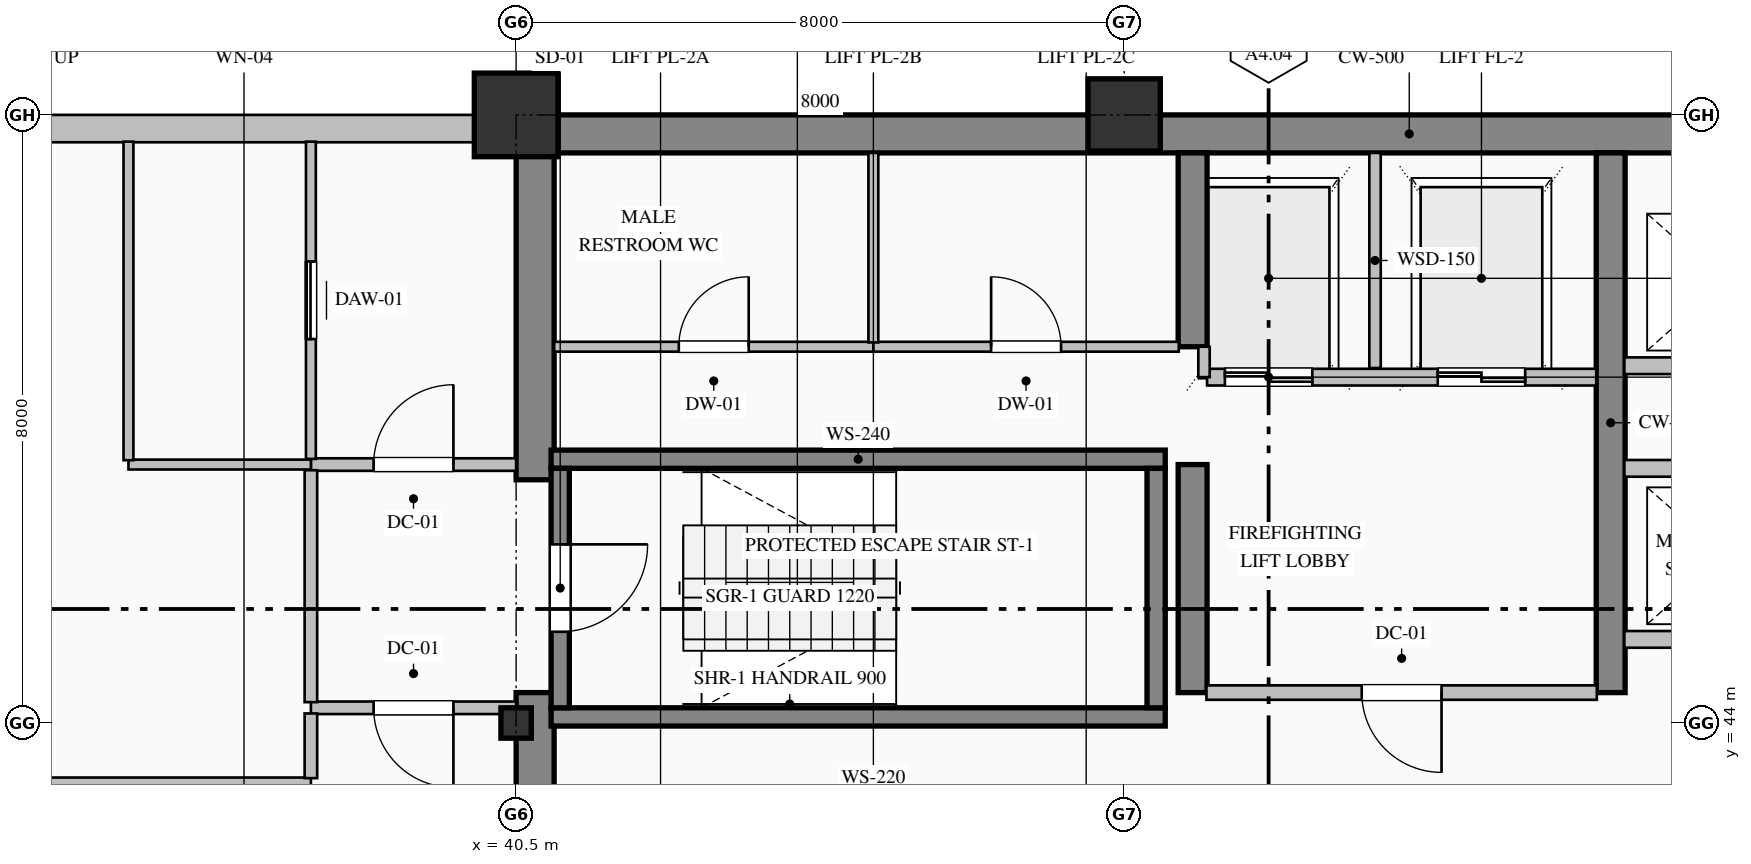
"""IFC4 building model, lengths in metres.
Left out: names, types, materials, properties, quantities, classifications, styles, units other than length and angle.
Written with IfcOpenShell. Run it as: python <this file> out.ifc"""

import sys

from ifc_helpers import new_model, si_unit, direction, frame, frame_2d, origin, origin_2d, place, context, subcontext, project, spatial, rectangle, hollow_rectangle, i_section, extrude, element, fill, save


model = new_model("IFC4")
c1 = context("Model", 3, precision=1e-05, world=origin(), true_north=direction((0.0, 1.0)))
c2 = subcontext(c1, "Body", "Model", "MODEL_VIEW")
j1 = project(units=[si_unit("LENGTHUNIT", "METRE"), si_unit("PLANEANGLEUNIT", "RADIAN")], contexts=[c1])
p1 = place(None, origin())
s1 = spatial("IfcSite", under=j1, at=p1, CompositionType="ELEMENT")
p2 = place(p1, origin())
s2 = spatial("IfcBuilding", under=s1, at=p2, CompositionType="ELEMENT")
p3 = place(p2, frame((0.0, 0.0, 151.0)))
s3 = spatial("IfcBuildingStorey", under=s2, at=p3, CompositionType="ELEMENT", Elevation=151.0)
p4 = place(p3, frame((40.5, 51.75, 0.0), z_axis=(0.0, 0.0, 1.0), x_axis=(1.0, 0.0, 0.0)))
e1 = element("IfcWall", 1, at=p4, inside=s3, PredefinedType="SHEAR", context=c2, shape_type="SweptSolid", body=[
    extrude(rectangle(XDim=23.5, YDim=0.5, at=frame_2d((11.75, 0.0))), origin(), (0.0, 0.0, 1.0), 3.765),
])
p5 = place(p3, frame((40.75, 36.5, 0.0), z_axis=(0.0, 0.0, 1.0), x_axis=(0.0, 1.0, 0.0)))
e2 = element("IfcWall", 2, at=p5, inside=s3, PredefinedType="SHEAR", context=c2, shape_type="SweptSolid", body=[
    extrude(rectangle(XDim=7.9, YDim=0.5, at=frame_2d((3.95, 0.0))), origin(), (0.0, 0.0, 1.0), 3.765),
])
p6 = place(p3, frame((40.75, 47.2, 0.0), z_axis=(0.0, 0.0, 1.0), x_axis=(0.0, 1.0, 0.0)))
e3 = element("IfcWall", 3, at=p6, inside=s3, PredefinedType="SHEAR", context=c2, shape_type="SweptSolid", body=[
    extrude(rectangle(XDim=4.3, YDim=0.5, at=frame_2d((2.15, 0.0))), origin(), (0.0, 0.0, 1.0), 3.765),
])
p7 = place(p3, frame((49.4, 44.4, 0.0), z_axis=(0.0, 0.0, 1.0), x_axis=(0.0, 1.0, 0.0)))
e4 = element("IfcWall", 4, at=p7, inside=s3, PredefinedType="SHEAR", context=c2, shape_type="SweptSolid", body=[
    extrude(rectangle(XDim=3.0, YDim=0.38, at=frame_2d((1.5, 0.0))), origin(), (0.0, 0.0, 1.0), 3.765),
])
p8 = place(p3, frame((49.4, 48.95, 0.0), z_axis=(0.0, 0.0, 1.0), x_axis=(0.0, 1.0, 0.0)))
e5 = element("IfcWall", 5, at=p8, inside=s3, PredefinedType="SHEAR", context=c2, shape_type="SweptSolid", body=[
    extrude(rectangle(XDim=2.55, YDim=0.38, at=frame_2d((1.275, 0.0))), origin(), (0.0, 0.0, 1.0), 3.765),
])
p9 = place(p3, frame((54.9, 44.4, 0.0), z_axis=(0.0, 0.0, 1.0), x_axis=(0.0, 1.0, 0.0)))
e6 = element("IfcWall", 6, at=p9, inside=s3, PredefinedType="SHEAR", context=c2, shape_type="SweptSolid", body=[
    extrude(rectangle(XDim=7.1, YDim=0.38, at=frame_2d((3.55, 0.0))), origin(), (0.0, 0.0, 1.0), 3.765),
])
p10 = place(p3, frame((40.5, 44.0, 0.0), z_axis=(0.0, 0.0, 1.0), x_axis=(1.0, 0.0, 0.0)))
e7 = element("IfcColumn", 7, at=p10, inside=s3, PredefinedType="COLUMN", context=c2, shape_type="SweptSolid", body=[
    extrude(i_section(OverallWidth=0.4, OverallDepth=0.4, WebThickness=0.013, FlangeThickness=0.021, FilletRadius=0.022, at=origin_2d()), origin(), (0.0, 0.0, 1.0), 4.0),
])
p11 = place(p3, frame((40.5, 52.0, 0.0), z_axis=(0.0, 0.0, 1.0), x_axis=(1.0, 0.0, 0.0)))
e8 = element("IfcColumn", 8, at=p11, inside=s3, PredefinedType="COLUMN", context=c2, shape_type="SweptSolid", body=[
    extrude(hollow_rectangle(XDim=1.1, YDim=1.1, WallThickness=0.04, at=origin_2d()), origin(), (0.0, 0.0, 1.0), 4.0),
])
p12 = place(p3, frame((48.5, 52.0, 0.0), z_axis=(0.0, 0.0, 1.0), x_axis=(1.0, 0.0, 0.0)))
e9 = element("IfcColumn", 9, at=p12, inside=s3, PredefinedType="COLUMN", context=c2, shape_type="SweptSolid", body=[
    extrude(hollow_rectangle(XDim=0.95, YDim=0.95, WallThickness=0.036, at=origin_2d()), origin(), (0.0, 0.0, 1.0), 4.0),
])
p13 = place(p3, frame((13.0, 51.82, 0.0), z_axis=(0.0, 0.0, 1.0), x_axis=(1.0, 0.0, 0.0)))
e10 = element("IfcWall", 10, at=p13, inside=s3, PredefinedType="SOLIDWALL", context=c2, shape_type="SweptSolid", body=[
    extrude(rectangle(XDim=27.52, YDim=0.36, at=frame_2d((13.76, 0.0))), origin(), (0.0, 0.0, 1.0), 3.265),
])
p14 = place(p13, frame((6.45, 0.0, 0.85)))
e11 = element("IfcOpeningElement", 11, at=p14, cuts=e10, PredefinedType="OPENING", context=c2, shape_type="SweptSolid", body=[
    extrude(rectangle(XDim=1.5, YDim=1.95, at=frame_2d((0.75, 0.975))), frame((0.0, 0.19, 0.0), z_axis=(0.0, -1.0, 0.0), x_axis=(1.0, 0.0, 0.0)), (0.0, 0.0, 1.0), 0.38),
])
p15 = place(p13, frame((13.8, 0.0, 0.7)))
e12 = element("IfcOpeningElement", 12, at=p15, cuts=e10, PredefinedType="OPENING", context=c2, shape_type="SweptSolid", body=[
    extrude(rectangle(XDim=1.2, YDim=1.85, at=frame_2d((0.6, 0.925))), frame((0.0, 0.19, 0.0), z_axis=(0.0, -1.0, 0.0), x_axis=(1.0, 0.0, 0.0)), (0.0, 0.0, 1.0), 0.38),
])
for number, where, z_axis, x_axis in (
    (13, (40.96, 47.47, 0.0), (0.0, 0.0, 1.0), (1.0, 0.0, 0.0)),
    (14, (49.04, 44.08, 0.0), (0.0, 0.0, 1.0), (-1.0, 0.0, 0.0)),
):
    element("IfcWall", number, at=place(p3, frame(where, z_axis=z_axis, x_axis=x_axis)), inside=s3, PredefinedType="SOLIDWALL", context=c2, shape_type="SweptSolid", body=[
        extrude(rectangle(XDim=8.08, YDim=0.24, at=frame_2d((4.04, 0.0))), origin(), (0.0, 0.0, 1.0), 4.0),
    ])
p16 = place(p3, frame((41.08, 47.35, 0.0), z_axis=(0.0, 0.0, 1.0), x_axis=(0.0, -1.0, 0.0)))
e15 = element("IfcWall", 15, at=p16, inside=s3, PredefinedType="SOLIDWALL", context=c2, shape_type="SweptSolid", body=[
    extrude(rectangle(XDim=3.15, YDim=0.24, at=frame_2d((1.575, 0.0))), origin(), (0.0, 0.0, 1.0), 4.0),
])
p17 = place(p16, frame((1.0, 0.0, 0.0)))
e16 = element("IfcOpeningElement", 16, at=p17, cuts=e15, PredefinedType="OPENING", context=c2, shape_type="SweptSolid", body=[
    extrude(rectangle(XDim=1.15, YDim=2.2, at=frame_2d((0.575, 1.1))), frame((0.0, 0.13, 0.0), z_axis=(0.0, -1.0, 0.0), x_axis=(1.0, 0.0, 0.0)), (0.0, 0.0, 1.0), 0.26),
])
p18 = place(p3, frame((48.92, 44.2, 0.0), z_axis=(0.0, 0.0, 1.0), x_axis=(0.0, 1.0, 0.0)))
e17 = element("IfcWall", 17, at=p18, inside=s3, PredefinedType="SOLIDWALL", context=c2, shape_type="SweptSolid", body=[
    extrude(rectangle(XDim=3.15, YDim=0.24, at=frame_2d((1.575, 0.0))), origin(), (0.0, 0.0, 1.0), 4.0),
])
p19 = place(p3, frame((54.71, 48.55, 0.0), z_axis=(0.0, 0.0, 1.0), x_axis=(-1.0, 0.0, 0.0)))
e18 = element("IfcWall", 18, at=p19, inside=s3, PredefinedType="PARTITIONING", context=c2, shape_type="SweptSolid", body=[
    extrude(rectangle(XDim=5.12, YDim=0.22, at=frame_2d((2.56, 0.0))), origin(), (0.0, 0.0, 1.0), 3.765),
])
p20 = place(p19, frame((3.735, 0.0, 0.0)))
e19 = element("IfcOpeningElement", 19, at=p20, cuts=e18, PredefinedType="OPENING", context=c2, shape_type="SweptSolid", body=[
    extrude(rectangle(XDim=1.15, YDim=2.2, at=frame_2d((0.575, 1.1))), frame((0.0, 0.12, 0.0), z_axis=(0.0, -1.0, 0.0), x_axis=(1.0, 0.0, 0.0)), (0.0, 0.0, 1.0), 0.24),
])
p21 = place(p19, frame((0.935, 0.0, 0.0)))
e20 = element("IfcOpeningElement", 20, at=p21, cuts=e18, PredefinedType="OPENING", context=c2, shape_type="SweptSolid", body=[
    extrude(rectangle(XDim=1.15, YDim=2.2, at=frame_2d((0.575, 1.1))), frame((0.0, 0.12, 0.0), z_axis=(0.0, -1.0, 0.0), x_axis=(1.0, 0.0, 0.0)), (0.0, 0.0, 1.0), 0.24),
])
p22 = place(p3, frame((51.8, 48.67, 0.0), z_axis=(0.0, 0.0, 1.0), x_axis=(0.0, 1.0, 0.0)))
e21 = element("IfcWall", 21, at=p22, inside=s3, PredefinedType="PARTITIONING", context=c2, shape_type="SweptSolid", body=[
    extrude(rectangle(XDim=2.83, YDim=0.15, at=frame_2d((1.415, 0.0))), origin(), (0.0, 0.0, 1.0), 3.765),
])
p23 = place(p3, frame((49.55, 48.55, 0.0), z_axis=(0.0, 0.0, 1.0), x_axis=(0.0, 1.0, 0.0)))
e22 = element("IfcWall", 22, at=p23, inside=s3, PredefinedType="PARTITIONING", context=c2, shape_type="SweptSolid", body=[
    extrude(rectangle(XDim=0.4, YDim=0.15, at=frame_2d((0.2, 0.0))), origin(), (0.0, 0.0, 1.0), 3.765),
])
for number, where, z_axis, x_axis in (
    (23, (63.32, 45.1, 0.0), (0.0, 0.0, 1.0), (-1.0, 0.0, 0.0)),
    (24, (55.08, 47.35, 0.0), (0.0, 0.0, 1.0), (1.0, 0.0, 0.0)),
    (25, (63.32, 48.7, 0.0), (0.0, 0.0, 1.0), (-1.0, 0.0, 0.0)),
):
    element("IfcWall", number, at=place(p3, frame(where, z_axis=z_axis, x_axis=x_axis)), inside=s3, PredefinedType="PARTITIONING", context=c2, shape_type="SweptSolid", body=[
        extrude(rectangle(XDim=8.24, YDim=0.22, at=frame_2d((4.12, 0.0))), origin(), (0.0, 0.0, 1.0), 3.765),
    ])
p24 = place(p3, frame((37.8, 47.4, 0.0), z_axis=(0.0, 0.0, 1.0), x_axis=(1.0, 0.0, 0.0)))
e26 = element("IfcWall", 26, at=p24, inside=s3, PredefinedType="PARTITIONING", context=c2, shape_type="SweptSolid", body=[
    extrude(rectangle(XDim=2.7, YDim=0.165, at=frame_2d((1.35, 0.0))), origin(), (0.0, 0.0, 1.0), 3.765),
])
p25 = place(p24, frame((0.825, 0.0, 0.0)))
e27 = element("IfcOpeningElement", 27, at=p25, cuts=e26, PredefinedType="OPENING", context=c2, shape_type="SweptSolid", body=[
    extrude(rectangle(XDim=1.05, YDim=2.15, at=frame_2d((0.525, 1.075))), frame((0.0, 0.093, 0.0), z_axis=(0.0, -1.0, 0.0), x_axis=(1.0, 0.0, 0.0)), (0.0, 0.0, 1.0), 0.185),
])
p26 = place(p3, frame((40.5, 44.2, 0.0), z_axis=(0.0, 0.0, 1.0), x_axis=(-1.0, 0.0, 0.0)))
e28 = element("IfcWall", 28, at=p26, inside=s3, PredefinedType="PARTITIONING", context=c2, shape_type="SweptSolid", body=[
    extrude(rectangle(XDim=2.7, YDim=0.165, at=frame_2d((1.35, 0.0))), origin(), (0.0, 0.0, 1.0), 3.765),
])
p27 = place(p26, frame((0.825, 0.0, 0.0)))
e29 = element("IfcOpeningElement", 29, at=p27, cuts=e28, PredefinedType="OPENING", context=c2, shape_type="SweptSolid", body=[
    extrude(rectangle(XDim=1.05, YDim=2.15, at=frame_2d((0.525, 1.075))), frame((0.0, 0.093, 0.0), z_axis=(0.0, -1.0, 0.0), x_axis=(1.0, 0.0, 0.0)), (0.0, 0.0, 1.0), 0.185),
])
p28 = place(p3, frame((37.8, 44.274, 0.0), z_axis=(0.0, 0.0, 1.0), x_axis=(0.0, 1.0, 0.0)))
e30 = element("IfcWall", 30, at=p28, inside=s3, PredefinedType="PARTITIONING", context=c2, shape_type="SweptSolid", body=[
    extrude(rectangle(XDim=3.051, YDim=0.165, at=frame_2d((1.525, 0.0))), origin(), (0.0, 0.0, 1.0), 3.765),
])
p29 = place(p3, frame((37.8, 47.475, 0.0), z_axis=(0.0, 0.0, 1.0), x_axis=(0.0, 1.0, 0.0)))
e31 = element("IfcWall", 31, at=p29, inside=s3, PredefinedType="PARTITIONING", context=c2, shape_type="SweptSolid", body=[
    extrude(rectangle(XDim=4.173, YDim=0.13, at=frame_2d((2.087, 0.0))), origin(), (0.0, 0.0, 1.0), 3.765),
])
p30 = place(p29, frame((1.577, 0.0, 0.0)))
e32 = element("IfcOpeningElement", 32, at=p30, cuts=e31, PredefinedType="OPENING", context=c2, shape_type="SweptSolid", body=[
    extrude(rectangle(XDim=1.02, YDim=2.15, at=frame_2d((0.51, 1.075))), frame((0.0, 0.075, 0.0), z_axis=(0.0, -1.0, 0.0), x_axis=(1.0, 0.0, 0.0)), (0.0, 0.0, 1.0), 0.15),
])
p31 = place(p3, frame((37.8, 47.4, 0.0), z_axis=(0.0, 0.0, 1.0), x_axis=(-1.0, 0.0, 0.0)))
e33 = element("IfcWall", 33, at=p31, inside=s3, PredefinedType="PARTITIONING", context=c2, shape_type="SweptSolid", body=[
    extrude(rectangle(XDim=2.4, YDim=0.13, at=frame_2d((1.2, 0.0))), origin(), (0.0, 0.0, 1.0), 3.765),
])
p32 = place(p3, frame((35.4, 47.457, 0.0), z_axis=(0.0, 0.0, 1.0), x_axis=(0.0, 1.0, 0.0)))
e34 = element("IfcWall", 34, at=p32, inside=s3, PredefinedType="PARTITIONING", context=c2, shape_type="SweptSolid", body=[
    extrude(rectangle(XDim=4.191, YDim=0.13, at=frame_2d((2.095, 0.0))), origin(), (0.0, 0.0, 1.0), 3.765),
])
p33 = place(p3, frame((41.0, 48.95, 0.0), z_axis=(0.0, 0.0, 1.0), x_axis=(1.0, 0.0, 0.0)))
e35 = element("IfcWall", 35, at=p33, inside=s3, PredefinedType="PARTITIONING", context=c2, shape_type="SweptSolid", body=[
    extrude(rectangle(XDim=4.2, YDim=0.13, at=frame_2d((2.1, 0.0))), origin(), (0.0, 0.0, 1.0), 3.765),
])
p34 = place(p33, frame((1.64, 0.0, 0.0)))
e36 = element("IfcOpeningElement", 36, at=p34, cuts=e35, PredefinedType="OPENING", context=c2, shape_type="SweptSolid", body=[
    extrude(rectangle(XDim=0.92, YDim=2.15, at=frame_2d((0.46, 1.075))), frame((0.0, 0.075, 0.0), z_axis=(0.0, -1.0, 0.0), x_axis=(1.0, 0.0, 0.0)), (0.0, 0.0, 1.0), 0.15),
])
p35 = place(p3, frame((45.2, 48.95, 0.0), z_axis=(0.0, 0.0, 1.0), x_axis=(1.0, 0.0, 0.0)))
e37 = element("IfcWall", 37, at=p35, inside=s3, PredefinedType="PARTITIONING", context=c2, shape_type="SweptSolid", body=[
    extrude(rectangle(XDim=4.018, YDim=0.13, at=frame_2d((2.009, 0.0))), origin(), (0.0, 0.0, 1.0), 3.765),
])
p36 = place(p35, frame((1.549, 0.0, 0.0)))
e38 = element("IfcOpeningElement", 38, at=p36, cuts=e37, PredefinedType="OPENING", context=c2, shape_type="SweptSolid", body=[
    extrude(rectangle(XDim=0.92, YDim=2.15, at=frame_2d((0.46, 1.075))), frame((0.0, 0.075, 0.0), z_axis=(0.0, -1.0, 0.0), x_axis=(1.0, 0.0, 0.0)), (0.0, 0.0, 1.0), 0.15),
])
p37 = place(p3, frame((54.718, 44.4, 0.0), z_axis=(0.0, 0.0, 1.0), x_axis=(-1.0, 0.0, 0.0)))
e39 = element("IfcWall", 39, at=p37, inside=s3, PredefinedType="PARTITIONING", context=c2, shape_type="SweptSolid", body=[
    extrude(rectangle(XDim=5.136, YDim=0.19, at=frame_2d((2.568, 0.0))), origin(), (0.0, 0.0, 1.0), 3.765),
])
p38 = place(p37, frame((2.043, 0.0, 0.0)))
e40 = element("IfcOpeningElement", 40, at=p38, cuts=e39, PredefinedType="OPENING", context=c2, shape_type="SweptSolid", body=[
    extrude(rectangle(XDim=1.05, YDim=2.15, at=frame_2d((0.525, 1.075))), frame((0.0, 0.105, 0.0), z_axis=(0.0, -1.0, 0.0), x_axis=(1.0, 0.0, 0.0)), (0.0, 0.0, 1.0), 0.21),
])
p39 = place(p3, frame((45.2, 51.5, 0.0), z_axis=(0.0, 0.0, 1.0), x_axis=(0.0, -1.0, 0.0)))
e41 = element("IfcWall", 41, at=p39, inside=s3, PredefinedType="PARTITIONING", context=c2, shape_type="SweptSolid", body=[
    extrude(rectangle(XDim=2.493, YDim=0.13, at=frame_2d((1.247, 0.0))), origin(), (0.0, 0.0, 1.0), 3.765),
])
p40 = place(p3, frame((24.5, 43.2, 0.0), z_axis=(0.0, 0.0, 1.0), x_axis=(1.0, 0.0, 0.0)))
e42 = element("IfcWall", 42, at=p40, inside=s3, PredefinedType="PARTITIONING", context=c2, shape_type="SweptSolid", body=[
    extrude(rectangle(XDim=13.3, YDim=0.165, at=frame_2d((6.65, 0.0))), origin(), (0.0, 0.0, 1.0), 3.765),
])
p41 = place(p40, frame((6.2, 0.0, 0.0)))
e43 = element("IfcOpeningElement", 43, at=p41, cuts=e42, PredefinedType="OPENING", context=c2, shape_type="SweptSolid", body=[
    extrude(rectangle(XDim=0.9, YDim=2.15, at=frame_2d((0.45, 1.075))), frame((0.0, 0.093, 0.0), z_axis=(0.0, -1.0, 0.0), x_axis=(1.0, 0.0, 0.0)), (0.0, 0.0, 1.0), 0.185),
])
p42 = place(p3, frame((37.8, 43.274, 0.0), z_axis=(0.0, 0.0, 1.0), x_axis=(0.0, 1.0, 0.0)))
e44 = element("IfcWall", 44, at=p42, inside=s3, PredefinedType="PARTITIONING", context=c2, shape_type="SweptSolid", body=[
    extrude(rectangle(XDim=0.851, YDim=0.165, at=frame_2d((0.426, 0.0))), origin(), (0.0, 0.0, 1.0), 3.765),
])
p43 = place(p17, origin())
e45 = element("IfcDoor", 45, at=p43, inside=s3, OperationType="SINGLE_SWING_LEFT", PredefinedType="DOOR", context=c2, shape_type="SweptSolid", body=[
    extrude(rectangle(XDim=1.15, YDim=2.2, at=frame_2d((0.575, 1.1))), frame((0.0, 0.025, 0.0), z_axis=(0.0, -1.0, 0.0), x_axis=(1.0, 0.0, 0.0)), (0.0, 0.0, 1.0), 0.05),
])
fill(e16, e45)
p44 = place(p20, origin())
e46 = element("IfcDoor", 46, at=p44, inside=s3, OperationType="DOUBLE_DOOR_SLIDING", PredefinedType="DOOR", context=c2, shape_type="SweptSolid", body=[
    extrude(rectangle(XDim=1.15, YDim=2.2, at=frame_2d((0.575, 1.1))), frame((0.0, 0.025, 0.0), z_axis=(0.0, -1.0, 0.0), x_axis=(1.0, 0.0, 0.0)), (0.0, 0.0, 1.0), 0.05),
])
fill(e19, e46)
p45 = place(p21, origin())
e47 = element("IfcDoor", 47, at=p45, inside=s3, OperationType="DOUBLE_DOOR_SLIDING", PredefinedType="DOOR", context=c2, shape_type="SweptSolid", body=[
    extrude(rectangle(XDim=1.15, YDim=2.2, at=frame_2d((0.575, 1.1))), frame((0.0, 0.025, 0.0), z_axis=(0.0, -1.0, 0.0), x_axis=(1.0, 0.0, 0.0)), (0.0, 0.0, 1.0), 0.05),
])
fill(e20, e47)
p46 = place(p38, origin())
e48 = element("IfcDoor", 48, at=p46, inside=s3, OperationType="SINGLE_SWING_LEFT", PredefinedType="DOOR", context=c2, shape_type="SweptSolid", body=[
    extrude(rectangle(XDim=1.05, YDim=2.15, at=frame_2d((0.525, 1.075))), frame((0.0, 0.025, 0.0), z_axis=(0.0, -1.0, 0.0), x_axis=(1.0, 0.0, 0.0)), (0.0, 0.0, 1.0), 0.05),
])
fill(e40, e48)
p47 = place(p25, origin())
e49 = element("IfcDoor", 49, at=p47, inside=s3, OperationType="SINGLE_SWING_RIGHT", PredefinedType="DOOR", context=c2, shape_type="SweptSolid", body=[
    extrude(rectangle(XDim=1.05, YDim=2.15, at=frame_2d((0.525, 1.075))), frame((0.0, 0.025, 0.0), z_axis=(0.0, -1.0, 0.0), x_axis=(1.0, 0.0, 0.0)), (0.0, 0.0, 1.0), 0.05),
])
fill(e27, e49)
p48 = place(p27, origin())
e50 = element("IfcDoor", 50, at=p48, inside=s3, OperationType="SINGLE_SWING_LEFT", PredefinedType="DOOR", context=c2, shape_type="SweptSolid", body=[
    extrude(rectangle(XDim=1.05, YDim=2.15, at=frame_2d((0.525, 1.075))), frame((0.0, 0.025, 0.0), z_axis=(0.0, -1.0, 0.0), x_axis=(1.0, 0.0, 0.0)), (0.0, 0.0, 1.0), 0.05),
])
fill(e29, e50)
p49 = place(p30, origin())
e51 = element("IfcDoor", 51, at=p49, inside=s3, OperationType="SLIDING_TO_LEFT", PredefinedType="DOOR", context=c2, shape_type="SweptSolid", body=[
    extrude(rectangle(XDim=1.02, YDim=2.15, at=frame_2d((0.51, 1.075))), frame((0.0, 0.025, 0.0), z_axis=(0.0, -1.0, 0.0), x_axis=(1.0, 0.0, 0.0)), (0.0, 0.0, 1.0), 0.05),
])
fill(e32, e51)
p50 = place(p34, origin())
e52 = element("IfcDoor", 52, at=p50, inside=s3, OperationType="SINGLE_SWING_RIGHT", PredefinedType="DOOR", context=c2, shape_type="SweptSolid", body=[
    extrude(rectangle(XDim=0.92, YDim=2.15, at=frame_2d((0.46, 1.075))), frame((0.0, 0.025, 0.0), z_axis=(0.0, -1.0, 0.0), x_axis=(1.0, 0.0, 0.0)), (0.0, 0.0, 1.0), 0.05),
])
fill(e36, e52)
p51 = place(p36, origin())
e53 = element("IfcDoor", 53, at=p51, inside=s3, OperationType="SINGLE_SWING_LEFT", PredefinedType="DOOR", context=c2, shape_type="SweptSolid", body=[
    extrude(rectangle(XDim=0.92, YDim=2.15, at=frame_2d((0.46, 1.075))), frame((0.0, 0.025, 0.0), z_axis=(0.0, -1.0, 0.0), x_axis=(1.0, 0.0, 0.0)), (0.0, 0.0, 1.0), 0.05),
])
fill(e38, e53)
save(model, sys.argv[1])
